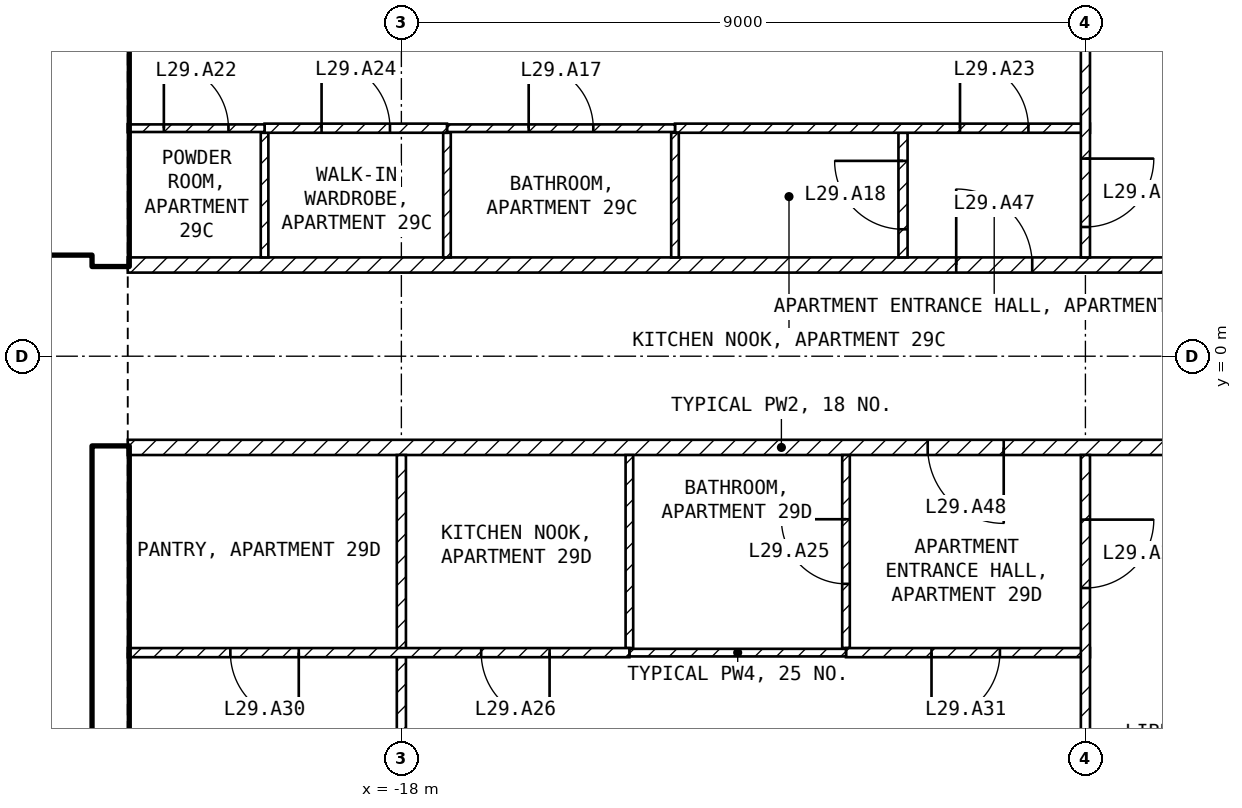
"""IFC4 building model, lengths in metres.
Left out: names, types, materials, properties, quantities, classifications, styles, units other than length and angle.
Written with IfcOpenShell. Run it as: python <this file> out.ifc"""

import sys

from ifc_helpers import new_model, si_unit, direction, frame, frame_2d, origin, place, context, subcontext, project, spatial, rectangle, extrude, element, fill, save


model = new_model("IFC4")
c1 = context("Model", 3, precision=1e-05, world=origin(), true_north=direction((0.0, 1.0)))
c2 = subcontext(c1, "Body", "Model", "MODEL_VIEW")
j1 = project(units=[si_unit("LENGTHUNIT", "METRE"), si_unit("PLANEANGLEUNIT", "RADIAN")], contexts=[c1])
p1 = place(None, origin())
s1 = spatial("IfcSite", under=j1, at=p1, CompositionType="ELEMENT")
p2 = place(p1, origin())
s2 = spatial("IfcBuilding", under=s1, at=p2, CompositionType="ELEMENT")
p3 = place(p2, frame((0.0, 0.0, 123.4)))
s3 = spatial("IfcBuildingStorey", under=s2, at=p3, CompositionType="ELEMENT", Elevation=123.4)
for number, where, z_axis, x_axis in (
    (1, (-21.825, -8.1, 0.0), (0.0, 0.0, 1.0), (0.0, 1.0, 0.0)),
    (2, (-21.825, 1.2, 0.0), (0.0, 0.0, 1.0), (0.0, 1.0, 0.0)),
):
    element("IfcWall", number, at=place(p3, frame(where, z_axis=z_axis, x_axis=x_axis)), inside=s3, PredefinedType="SHEAR", context=c2, shape_type="SweptSolid", body=[
        extrude(rectangle(XDim=6.9, YDim=0.45, at=frame_2d((3.45, 0.0))), origin(), (0.0, 0.0, 1.0), 3.25),
    ])
p4 = place(p3, frame((-33.05, 1.45, 0.0), z_axis=(0.0, 0.0, 1.0), x_axis=(1.0, 0.0, 0.0)))
e3 = element("IfcWall", 3, at=p4, inside=s3, PredefinedType="SOLIDWALL", context=c2, shape_type="SweptSolid", body=[
    extrude(rectangle(XDim=11.0, YDim=0.2, at=frame_2d((5.5, 0.0))), origin(), (0.0, 0.0, 1.0), 3.25),
])
p5 = place(p4, frame((9.25, 0.0, 0.0)))
e4 = element("IfcOpeningElement", 4, at=p5, cuts=e3, PredefinedType="OPENING", context=c2, shape_type="SweptSolid", body=[
    extrude(rectangle(XDim=1.0, YDim=2.1, at=frame_2d((0.5, 1.05))), frame((0.0, 0.11, 0.0), z_axis=(0.0, -1.0, 0.0), x_axis=(1.0, 0.0, 0.0)), (0.0, 0.0, 1.0), 0.22),
])
p6 = place(p4, frame((6.75, 0.0, 0.0)))
e5 = element("IfcOpeningElement", 5, at=p6, cuts=e3, PredefinedType="OPENING", context=c2, shape_type="SweptSolid", body=[
    extrude(rectangle(XDim=1.0, YDim=2.1, at=frame_2d((0.5, 1.05))), frame((0.0, 0.11, 0.0), z_axis=(0.0, -1.0, 0.0), x_axis=(1.0, 0.0, 0.0)), (0.0, 0.0, 1.0), 0.22),
])
p7 = place(p4, frame((1.025, 0.0, 0.0)))
e6 = element("IfcOpeningElement", 6, at=p7, cuts=e3, PredefinedType="OPENING", context=c2, shape_type="SweptSolid", body=[
    extrude(rectangle(XDim=0.9, YDim=2.1, at=frame_2d((0.45, 1.05))), frame((0.0, 0.11, 0.0), z_axis=(0.0, -1.0, 0.0), x_axis=(1.0, 0.0, 0.0)), (0.0, 0.0, 1.0), 0.22),
])
p8 = place(p3, frame((-21.6, 1.2, 0.0), z_axis=(0.0, 0.0, 1.0), x_axis=(1.0, 0.0, 0.0)))
e7 = element("IfcWall", 7, at=p8, inside=s3, PredefinedType="PARTITIONING", context=c2, shape_type="SweptSolid", body=[
    extrude(rectangle(XDim=17.2, YDim=0.2, at=frame_2d((8.6, 0.0))), origin(), (0.0, 0.0, 1.0), 3.25),
])
p9 = place(p8, frame((10.9, 0.0, 0.0)))
e8 = element("IfcOpeningElement", 8, at=p9, cuts=e7, PredefinedType="OPENING", context=c2, shape_type="SweptSolid", body=[
    extrude(rectangle(XDim=1.0, YDim=2.1, at=frame_2d((0.5, 1.05))), frame((0.0, 0.11, 0.0), z_axis=(0.0, -1.0, 0.0), x_axis=(1.0, 0.0, 0.0)), (0.0, 0.0, 1.0), 0.22),
])
p10 = place(p3, frame((-4.4, -1.2, 0.0), z_axis=(0.0, 0.0, 1.0), x_axis=(-1.0, 0.0, 0.0)))
e9 = element("IfcWall", 9, at=p10, inside=s3, PredefinedType="PARTITIONING", context=c2, shape_type="SweptSolid", body=[
    extrude(rectangle(XDim=17.2, YDim=0.2, at=frame_2d((8.6, 0.0))), origin(), (0.0, 0.0, 1.0), 3.25),
])
p11 = place(p10, frame((5.675, 0.0, 0.0)))
e10 = element("IfcOpeningElement", 10, at=p11, cuts=e9, PredefinedType="OPENING", context=c2, shape_type="SweptSolid", body=[
    extrude(rectangle(XDim=1.0, YDim=2.1, at=frame_2d((0.5, 1.05))), frame((0.0, 0.11, 0.0), z_axis=(0.0, -1.0, 0.0), x_axis=(1.0, 0.0, 0.0)), (0.0, 0.0, 1.0), 0.22),
])
p12 = place(p3, frame((-11.4, 1.3, 0.0), z_axis=(0.0, 0.0, 1.0), x_axis=(0.0, 1.0, 0.0)))
e11 = element("IfcWall", 11, at=p12, inside=s3, PredefinedType="PARTITIONING", context=c2, shape_type="SweptSolid", body=[
    extrude(rectangle(XDim=1.64, YDim=0.12, at=frame_2d((0.82, 0.0))), origin(), (0.0, 0.0, 1.0), 3.25),
])
p13 = place(p12, frame((0.37, 0.0, 0.0)))
e12 = element("IfcOpeningElement", 12, at=p13, cuts=e11, PredefinedType="OPENING", context=c2, shape_type="SweptSolid", body=[
    extrude(rectangle(XDim=0.9, YDim=2.1, at=frame_2d((0.45, 1.05))), frame((0.0, 0.07, 0.0), z_axis=(0.0, -1.0, 0.0), x_axis=(1.0, 0.0, 0.0)), (0.0, 0.0, 1.0), 0.14),
])
p14 = place(p3, frame((-14.4, 3.0, 0.0), z_axis=(0.0, 0.0, 1.0), x_axis=(1.0, 0.0, 0.0)))
e13 = element("IfcWall", 13, at=p14, inside=s3, PredefinedType="PARTITIONING", context=c2, shape_type="SweptSolid", body=[
    extrude(rectangle(XDim=5.46, YDim=0.12, at=frame_2d((2.73, 0.0))), origin(), (0.0, 0.0, 1.0), 3.25),
])
p15 = place(p14, frame((3.75, 0.0, 0.0)))
e14 = element("IfcOpeningElement", 14, at=p15, cuts=e13, PredefinedType="OPENING", context=c2, shape_type="SweptSolid", body=[
    extrude(rectangle(XDim=0.9, YDim=2.1, at=frame_2d((0.45, 1.05))), frame((0.0, 0.07, 0.0), z_axis=(0.0, -1.0, 0.0), x_axis=(1.0, 0.0, 0.0)), (0.0, 0.0, 1.0), 0.14),
])
p16 = place(p3, frame((-9.0, 8.92, 0.0), z_axis=(0.0, 0.0, 1.0), x_axis=(0.0, -1.0, 0.0)))
e15 = element("IfcWall", 15, at=p16, inside=s3, PredefinedType="PARTITIONING", context=c2, shape_type="SweptSolid", body=[
    extrude(rectangle(XDim=7.62, YDim=0.12, at=frame_2d((3.81, 0.0))), origin(), (0.0, 0.0, 1.0), 3.25),
])
p17 = place(p16, frame((6.32, 0.0, 0.0)))
e16 = element("IfcOpeningElement", 16, at=p17, cuts=e15, PredefinedType="OPENING", context=c2, shape_type="SweptSolid", body=[
    extrude(rectangle(XDim=0.9, YDim=2.1, at=frame_2d((0.45, 1.05))), frame((0.0, 0.07, 0.0), z_axis=(0.0, -1.0, 0.0), x_axis=(1.0, 0.0, 0.0)), (0.0, 0.0, 1.0), 0.14),
])
for number, where, z_axis, x_axis in (
    (17, (-14.4, 1.3, 0.0), (0.0, 0.0, 1.0), (0.0, 1.0, 0.0)),
    (18, (-17.4, 1.3, 0.0), (0.0, 0.0, 1.0), (0.0, 1.0, 0.0)),
):
    element("IfcWall", number, at=place(p3, frame(where, z_axis=z_axis, x_axis=x_axis)), inside=s3, PredefinedType="PARTITIONING", context=c2, shape_type="SweptSolid", body=[
        extrude(rectangle(XDim=1.64, YDim=0.1, at=frame_2d((0.82, 0.0))), origin(), (0.0, 0.0, 1.0), 3.25),
    ])
p18 = place(p3, frame((-17.4, 3.0, 0.0), z_axis=(0.0, 0.0, 1.0), x_axis=(1.0, 0.0, 0.0)))
e19 = element("IfcWall", 19, at=p18, inside=s3, PredefinedType="PARTITIONING", context=c2, shape_type="SweptSolid", body=[
    extrude(rectangle(XDim=3.0, YDim=0.1, at=frame_2d((1.5, 0.0))), origin(), (0.0, 0.0, 1.0), 3.25),
])
p19 = place(p18, frame((1.075, 0.0, 0.0)))
e20 = element("IfcOpeningElement", 20, at=p19, cuts=e19, PredefinedType="OPENING", context=c2, shape_type="SweptSolid", body=[
    extrude(rectangle(XDim=0.85, YDim=2.1, at=frame_2d((0.425, 1.05))), frame((0.0, 0.06, 0.0), z_axis=(0.0, -1.0, 0.0), x_axis=(1.0, 0.0, 0.0)), (0.0, 0.0, 1.0), 0.12),
])
p20 = place(p3, frame((-19.8, 1.3, 0.0), z_axis=(0.0, 0.0, 1.0), x_axis=(0.0, 1.0, 0.0)))
e21 = element("IfcWall", 21, at=p20, inside=s3, PredefinedType="PARTITIONING", context=c2, shape_type="SweptSolid", body=[
    extrude(rectangle(XDim=1.64, YDim=0.1, at=frame_2d((0.82, 0.0))), origin(), (0.0, 0.0, 1.0), 3.25),
])
p21 = place(p3, frame((-19.8, 3.0, 0.0), z_axis=(0.0, 0.0, 1.0), x_axis=(1.0, 0.0, 0.0)))
e22 = element("IfcWall", 22, at=p21, inside=s3, PredefinedType="PARTITIONING", context=c2, shape_type="SweptSolid", body=[
    extrude(rectangle(XDim=2.4, YDim=0.12, at=frame_2d((1.2, 0.0))), origin(), (0.0, 0.0, 1.0), 3.25),
])
p22 = place(p21, frame((0.75, 0.0, 0.0)))
e23 = element("IfcOpeningElement", 23, at=p22, cuts=e22, PredefinedType="OPENING", context=c2, shape_type="SweptSolid", body=[
    extrude(rectangle(XDim=0.9, YDim=2.1, at=frame_2d((0.45, 1.05))), frame((0.0, 0.07, 0.0), z_axis=(0.0, -1.0, 0.0), x_axis=(1.0, 0.0, 0.0)), (0.0, 0.0, 1.0), 0.14),
])
p23 = place(p3, frame((-21.6, 3.0, 0.0), z_axis=(0.0, 0.0, 1.0), x_axis=(1.0, 0.0, 0.0)))
e24 = element("IfcWall", 24, at=p23, inside=s3, PredefinedType="PARTITIONING", context=c2, shape_type="SweptSolid", body=[
    extrude(rectangle(XDim=1.8, YDim=0.1, at=frame_2d((0.9, 0.0))), origin(), (0.0, 0.0, 1.0), 3.25),
])
p24 = place(p23, frame((0.475, 0.0, 0.0)))
e25 = element("IfcOpeningElement", 25, at=p24, cuts=e24, PredefinedType="OPENING", context=c2, shape_type="SweptSolid", body=[
    extrude(rectangle(XDim=0.85, YDim=2.1, at=frame_2d((0.425, 1.05))), frame((0.0, 0.06, 0.0), z_axis=(0.0, -1.0, 0.0), x_axis=(1.0, 0.0, 0.0)), (0.0, 0.0, 1.0), 0.12),
])
p25 = place(p3, frame((-12.15, -3.84, 0.0), z_axis=(0.0, 0.0, 1.0), x_axis=(0.0, 1.0, 0.0)))
e26 = element("IfcWall", 26, at=p25, inside=s3, PredefinedType="PARTITIONING", context=c2, shape_type="SweptSolid", body=[
    extrude(rectangle(XDim=2.54, YDim=0.1, at=frame_2d((1.27, 0.0))), origin(), (0.0, 0.0, 1.0), 3.25),
])
p26 = place(p25, frame((0.845, 0.0, 0.0)))
e27 = element("IfcOpeningElement", 27, at=p26, cuts=e26, PredefinedType="OPENING", context=c2, shape_type="SweptSolid", body=[
    extrude(rectangle(XDim=0.85, YDim=2.1, at=frame_2d((0.425, 1.05))), frame((0.0, 0.06, 0.0), z_axis=(0.0, -1.0, 0.0), x_axis=(1.0, 0.0, 0.0)), (0.0, 0.0, 1.0), 0.12),
])
p27 = place(p3, frame((-8.94, -3.9, 0.0), z_axis=(0.0, 0.0, 1.0), x_axis=(-1.0, 0.0, 0.0)))
e28 = element("IfcWall", 28, at=p27, inside=s3, PredefinedType="PARTITIONING", context=c2, shape_type="SweptSolid", body=[
    extrude(rectangle(XDim=3.21, YDim=0.12, at=frame_2d((1.605, 0.0))), origin(), (0.0, 0.0, 1.0), 3.25),
])
p28 = place(p27, frame((1.185, 0.0, 0.0)))
e29 = element("IfcOpeningElement", 29, at=p28, cuts=e28, PredefinedType="OPENING", context=c2, shape_type="SweptSolid", body=[
    extrude(rectangle(XDim=0.9, YDim=2.1, at=frame_2d((0.45, 1.05))), frame((0.0, 0.07, 0.0), z_axis=(0.0, -1.0, 0.0), x_axis=(1.0, 0.0, 0.0)), (0.0, 0.0, 1.0), 0.14),
])
p29 = place(p3, frame((-9.0, -1.3, 0.0), z_axis=(0.0, 0.0, 1.0), x_axis=(0.0, -1.0, 0.0)))
e30 = element("IfcWall", 30, at=p29, inside=s3, PredefinedType="PARTITIONING", context=c2, shape_type="SweptSolid", body=[
    extrude(rectangle(XDim=7.62, YDim=0.12, at=frame_2d((3.81, 0.0))), origin(), (0.0, 0.0, 1.0), 3.25),
])
p30 = place(p29, frame((0.85, 0.0, 0.0)))
e31 = element("IfcOpeningElement", 31, at=p30, cuts=e30, PredefinedType="OPENING", context=c2, shape_type="SweptSolid", body=[
    extrude(rectangle(XDim=0.9, YDim=2.1, at=frame_2d((0.45, 1.05))), frame((0.0, 0.07, 0.0), z_axis=(0.0, -1.0, 0.0), x_axis=(1.0, 0.0, 0.0)), (0.0, 0.0, 1.0), 0.14),
])
p31 = place(p3, frame((-15.0, -3.84, 0.0), z_axis=(0.0, 0.0, 1.0), x_axis=(0.0, 1.0, 0.0)))
e32 = element("IfcWall", 32, at=p31, inside=s3, PredefinedType="PARTITIONING", context=c2, shape_type="SweptSolid", body=[
    extrude(rectangle(XDim=2.54, YDim=0.1, at=frame_2d((1.27, 0.0))), origin(), (0.0, 0.0, 1.0), 3.25),
])
p32 = place(p3, frame((-12.15, -3.9, 0.0), z_axis=(0.0, 0.0, 1.0), x_axis=(-1.0, 0.0, 0.0)))
e33 = element("IfcWall", 33, at=p32, inside=s3, PredefinedType="PARTITIONING", context=c2, shape_type="SweptSolid", body=[
    extrude(rectangle(XDim=2.85, YDim=0.1, at=frame_2d((1.425, 0.0))), origin(), (0.0, 0.0, 1.0), 3.25),
])
p33 = place(p3, frame((-18.0, -8.92, 0.0), z_axis=(0.0, 0.0, 1.0), x_axis=(0.0, 1.0, 0.0)))
e34 = element("IfcWall", 34, at=p33, inside=s3, PredefinedType="PARTITIONING", context=c2, shape_type="SweptSolid", body=[
    extrude(rectangle(XDim=7.62, YDim=0.12, at=frame_2d((3.81, 0.0))), origin(), (0.0, 0.0, 1.0), 2.414),
])
p34 = place(p33, frame((2.62, 0.0, 0.0)))
e35 = element("IfcOpeningElement", 35, at=p34, cuts=e34, PredefinedType="OPENING", context=c2, shape_type="SweptSolid", body=[
    extrude(rectangle(XDim=0.9, YDim=2.1, at=frame_2d((0.45, 1.05))), frame((0.0, 0.07, 0.0), z_axis=(0.0, -1.0, 0.0), x_axis=(1.0, 0.0, 0.0)), (0.0, 0.0, 1.0), 0.14),
])
p35 = place(p3, frame((-15.0, -3.9, 0.0), z_axis=(0.0, 0.0, 1.0), x_axis=(-1.0, 0.0, 0.0)))
e36 = element("IfcWall", 36, at=p35, inside=s3, PredefinedType="PARTITIONING", context=c2, shape_type="SweptSolid", body=[
    extrude(rectangle(XDim=6.6, YDim=0.12, at=frame_2d((3.3, 0.0))), origin(), (0.0, 0.0, 1.0), 3.25),
])
p36 = place(p35, frame((1.05, 0.0, 0.0)))
e37 = element("IfcOpeningElement", 37, at=p36, cuts=e36, PredefinedType="OPENING", context=c2, shape_type="SweptSolid", body=[
    extrude(rectangle(XDim=0.9, YDim=2.1, at=frame_2d((0.45, 1.05))), frame((0.0, 0.07, 0.0), z_axis=(0.0, -1.0, 0.0), x_axis=(1.0, 0.0, 0.0)), (0.0, 0.0, 1.0), 0.14),
])
p37 = place(p35, frame((4.35, 0.0, 0.0)))
e38 = element("IfcOpeningElement", 38, at=p37, cuts=e36, PredefinedType="OPENING", context=c2, shape_type="SweptSolid", body=[
    extrude(rectangle(XDim=0.9, YDim=2.1, at=frame_2d((0.45, 1.05))), frame((0.0, 0.07, 0.0), z_axis=(0.0, -1.0, 0.0), x_axis=(1.0, 0.0, 0.0)), (0.0, 0.0, 1.0), 0.14),
])
p38 = place(p19, origin())
e39 = element("IfcDoor", 39, at=p38, inside=s3, OperationType="SINGLE_SWING_LEFT", PredefinedType="DOOR", context=c2, shape_type="SweptSolid", body=[
    extrude(rectangle(XDim=0.85, YDim=2.1, at=frame_2d((0.425, 1.05))), frame((0.0, 0.025, 0.0), z_axis=(0.0, -1.0, 0.0), x_axis=(1.0, 0.0, 0.0)), (0.0, 0.0, 1.0), 0.05),
])
fill(e20, e39)
p39 = place(p13, origin())
e40 = element("IfcDoor", 40, at=p39, inside=s3, OperationType="SINGLE_SWING_RIGHT", PredefinedType="DOOR", context=c2, shape_type="SweptSolid", body=[
    extrude(rectangle(XDim=0.9, YDim=2.1, at=frame_2d((0.45, 1.05))), frame((0.0, 0.025, 0.0), z_axis=(0.0, -1.0, 0.0), x_axis=(1.0, 0.0, 0.0)), (0.0, 0.0, 1.0), 0.05),
])
fill(e12, e40)
p40 = place(p17, origin())
e41 = element("IfcDoor", 41, at=p40, inside=s3, OperationType="SINGLE_SWING_LEFT", PredefinedType="DOOR", context=c2, shape_type="SweptSolid", body=[
    extrude(rectangle(XDim=0.9, YDim=2.1, at=frame_2d((0.45, 1.05))), frame((0.0, 0.025, 0.0), z_axis=(0.0, -1.0, 0.0), x_axis=(1.0, 0.0, 0.0)), (0.0, 0.0, 1.0), 0.05),
])
fill(e16, e41)
p41 = place(p24, origin())
e42 = element("IfcDoor", 42, at=p41, inside=s3, OperationType="SINGLE_SWING_LEFT", PredefinedType="DOOR", context=c2, shape_type="SweptSolid", body=[
    extrude(rectangle(XDim=0.85, YDim=2.1, at=frame_2d((0.425, 1.05))), frame((0.0, 0.025, 0.0), z_axis=(0.0, -1.0, 0.0), x_axis=(1.0, 0.0, 0.0)), (0.0, 0.0, 1.0), 0.05),
])
fill(e25, e42)
p42 = place(p15, origin())
e43 = element("IfcDoor", 43, at=p42, inside=s3, OperationType="SINGLE_SWING_LEFT", PredefinedType="DOOR", context=c2, shape_type="SweptSolid", body=[
    extrude(rectangle(XDim=0.9, YDim=2.1, at=frame_2d((0.45, 1.05))), frame((0.0, 0.025, 0.0), z_axis=(0.0, -1.0, 0.0), x_axis=(1.0, 0.0, 0.0)), (0.0, 0.0, 1.0), 0.05),
])
fill(e14, e43)
p43 = place(p22, origin())
e44 = element("IfcDoor", 44, at=p43, inside=s3, OperationType="SINGLE_SWING_LEFT", PredefinedType="DOOR", context=c2, shape_type="SweptSolid", body=[
    extrude(rectangle(XDim=0.9, YDim=2.1, at=frame_2d((0.45, 1.05))), frame((0.0, 0.025, 0.0), z_axis=(0.0, -1.0, 0.0), x_axis=(1.0, 0.0, 0.0)), (0.0, 0.0, 1.0), 0.05),
])
fill(e23, e44)
p44 = place(p26, origin())
e45 = element("IfcDoor", 45, at=p44, inside=s3, OperationType="SINGLE_SWING_RIGHT", PredefinedType="DOOR", context=c2, shape_type="SweptSolid", body=[
    extrude(rectangle(XDim=0.85, YDim=2.1, at=frame_2d((0.425, 1.05))), frame((0.0, 0.025, 0.0), z_axis=(0.0, -1.0, 0.0), x_axis=(1.0, 0.0, 0.0)), (0.0, 0.0, 1.0), 0.05),
])
fill(e27, e45)
p45 = place(p36, origin())
e46 = element("IfcDoor", 46, at=p45, inside=s3, OperationType="SINGLE_SWING_LEFT", PredefinedType="DOOR", context=c2, shape_type="SweptSolid", body=[
    extrude(rectangle(XDim=0.9, YDim=2.1, at=frame_2d((0.45, 1.05))), frame((0.0, 0.025, 0.0), z_axis=(0.0, -1.0, 0.0), x_axis=(1.0, 0.0, 0.0)), (0.0, 0.0, 1.0), 0.05),
])
fill(e37, e46)
p46 = place(p30, origin())
e47 = element("IfcDoor", 47, at=p46, inside=s3, OperationType="SINGLE_SWING_LEFT", PredefinedType="DOOR", context=c2, shape_type="SweptSolid", body=[
    extrude(rectangle(XDim=0.9, YDim=2.1, at=frame_2d((0.45, 1.05))), frame((0.0, 0.025, 0.0), z_axis=(0.0, -1.0, 0.0), x_axis=(1.0, 0.0, 0.0)), (0.0, 0.0, 1.0), 0.05),
])
fill(e31, e47)
p47 = place(p37, origin())
e48 = element("IfcDoor", 48, at=p47, inside=s3, OperationType="SINGLE_SWING_LEFT", PredefinedType="DOOR", context=c2, shape_type="SweptSolid", body=[
    extrude(rectangle(XDim=0.9, YDim=2.1, at=frame_2d((0.45, 1.05))), frame((0.0, 0.025, 0.0), z_axis=(0.0, -1.0, 0.0), x_axis=(1.0, 0.0, 0.0)), (0.0, 0.0, 1.0), 0.05),
])
fill(e38, e48)
p48 = place(p28, origin())
e49 = element("IfcDoor", 49, at=p48, inside=s3, OperationType="SINGLE_SWING_RIGHT", PredefinedType="DOOR", context=c2, shape_type="SweptSolid", body=[
    extrude(rectangle(XDim=0.9, YDim=2.1, at=frame_2d((0.45, 1.05))), frame((0.0, 0.025, 0.0), z_axis=(0.0, -1.0, 0.0), x_axis=(1.0, 0.0, 0.0)), (0.0, 0.0, 1.0), 0.05),
])
fill(e29, e49)
p49 = place(p9, origin())
e50 = element("IfcDoor", 50, at=p49, inside=s3, OperationType="SINGLE_SWING_LEFT", PredefinedType="DOOR", context=c2, shape_type="SweptSolid", body=[
    extrude(rectangle(XDim=1.0, YDim=2.1, at=frame_2d((0.5, 1.05))), frame((0.0, 0.025, 0.0), z_axis=(0.0, -1.0, 0.0), x_axis=(1.0, 0.0, 0.0)), (0.0, 0.0, 1.0), 0.05),
])
fill(e8, e50)
p50 = place(p11, origin())
e51 = element("IfcDoor", 51, at=p50, inside=s3, OperationType="SINGLE_SWING_LEFT", PredefinedType="DOOR", context=c2, shape_type="SweptSolid", body=[
    extrude(rectangle(XDim=1.0, YDim=2.1, at=frame_2d((0.5, 1.05))), frame((0.0, 0.025, 0.0), z_axis=(0.0, -1.0, 0.0), x_axis=(1.0, 0.0, 0.0)), (0.0, 0.0, 1.0), 0.05),
])
fill(e10, e51)
save(model, sys.argv[1])
